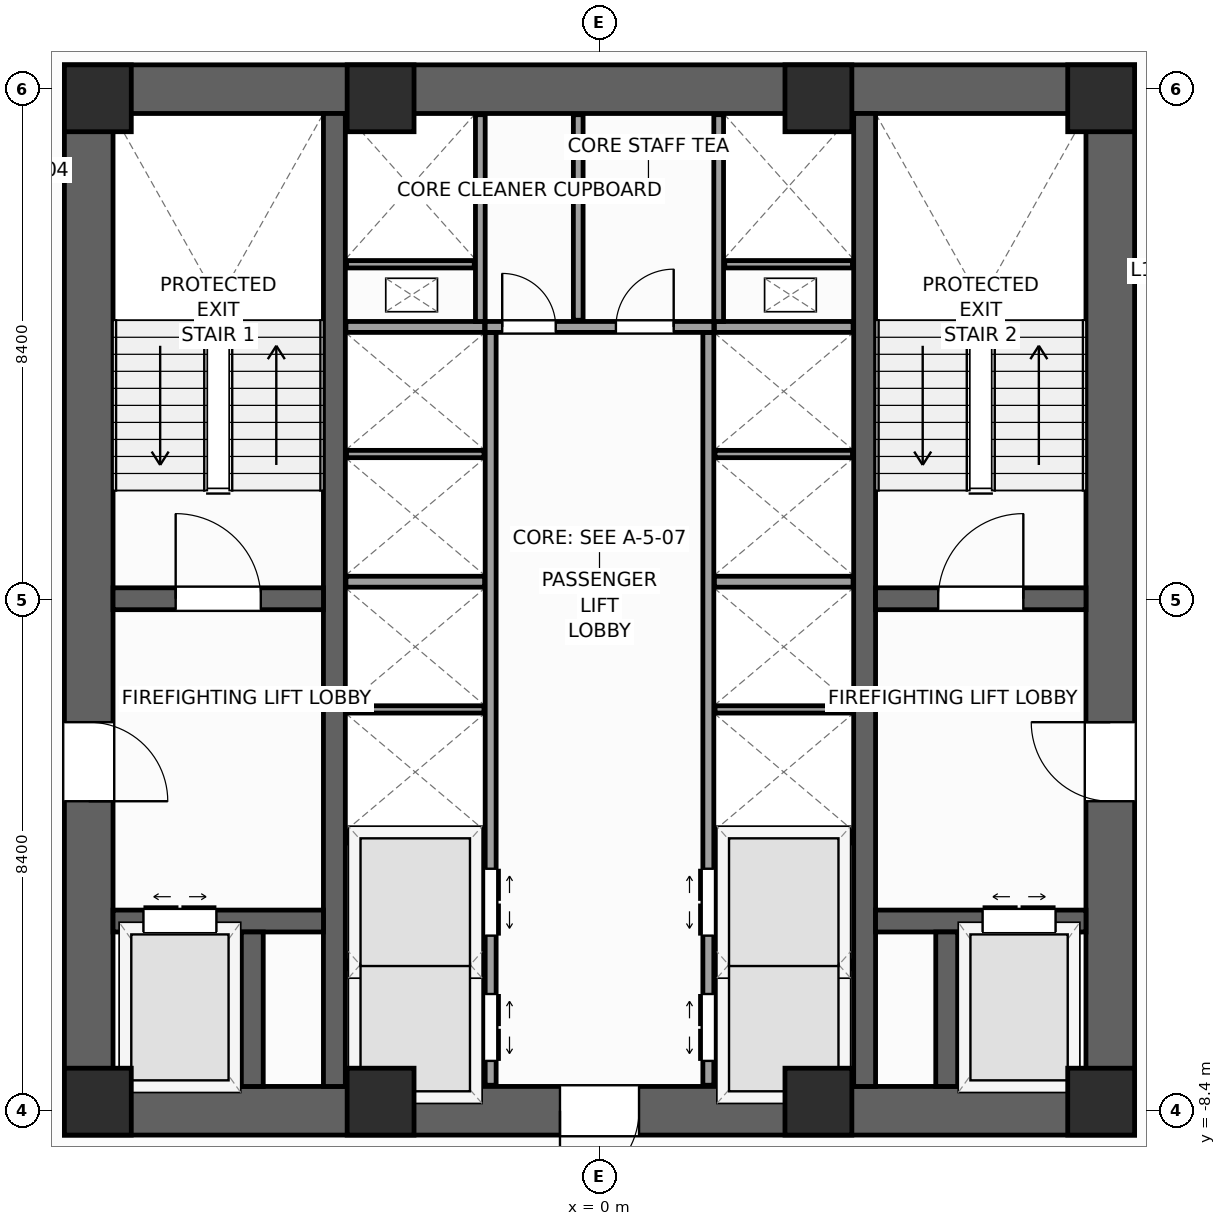
"""IFC4 building model, lengths in metres.
Left out: names, types, materials, properties, quantities, classifications, styles, units other than length and angle.
Written with IfcOpenShell. Run it as: python <this file> out.ifc"""

import sys

from ifc_helpers import new_model, si_unit, direction, frame, frame_2d, origin, origin_2d, place, context, subcontext, project, spatial, rectangle, extrude, source, transform, mapped, element, fill, save


model = new_model("IFC4")
c1 = context("Model", 3, precision=1e-05, world=origin(), true_north=direction((0.0, 1.0)))
c2 = subcontext(c1, "Body", "Model", "MODEL_VIEW")
j1 = project(units=[si_unit("LENGTHUNIT", "METRE"), si_unit("PLANEANGLEUNIT", "RADIAN")], contexts=[c1])
p1 = place(None, origin())
s1 = spatial("IfcSite", under=j1, at=p1, CompositionType="ELEMENT")
p2 = place(p1, origin())
s2 = spatial("IfcBuilding", under=s1, at=p2, CompositionType="ELEMENT")
p3 = place(p2, frame((0.0, 0.0, 62.0)))
s3 = spatial("IfcBuildingStorey", under=s2, at=p3, CompositionType="ELEMENT", Elevation=62.0)
p4 = place(p3, frame((-8.8, -8.4, 0.0), z_axis=(0.0, 0.0, 1.0), x_axis=(1.0, 0.0, 0.0)))
e1 = element("IfcWall", 1, at=p4, inside=s3, PredefinedType="SHEAR", context=c2, shape_type="SweptSolid", body=[
    extrude(rectangle(XDim=17.6, YDim=0.8, at=frame_2d((8.8, 0.0))), origin(), (0.0, 0.0, 1.0), 4.0),
])
p5 = place(p4, frame((8.15, 0.0, 0.0)))
e2 = element("IfcOpeningElement", 2, at=p5, cuts=e1, PredefinedType="OPENING", context=c2, shape_type="SweptSolid", body=[
    extrude(rectangle(XDim=1.3, YDim=2.2, at=frame_2d((0.65, 1.1))), frame((0.0, 0.41, 0.0), z_axis=(0.0, -1.0, 0.0), x_axis=(1.0, 0.0, 0.0)), (0.0, 0.0, 1.0), 0.82),
])
p6 = place(p3, frame((-8.8, 8.4, 0.0), z_axis=(0.0, 0.0, 1.0), x_axis=(1.0, 0.0, 0.0)))
e3 = element("IfcWall", 3, at=p6, inside=s3, PredefinedType="SHEAR", context=c2, shape_type="SweptSolid", body=[
    extrude(rectangle(XDim=17.6, YDim=0.8, at=frame_2d((8.8, 0.0))), origin(), (0.0, 0.0, 1.0), 4.0),
])
p7 = place(p3, frame((-8.4, -8.0, 0.0), z_axis=(0.0, 0.0, 1.0), x_axis=(0.0, 1.0, 0.0)))
e4 = element("IfcWall", 4, at=p7, inside=s3, PredefinedType="SHEAR", context=c2, shape_type="SweptSolid", body=[
    extrude(rectangle(XDim=16.0, YDim=0.8, at=frame_2d((8.0, 0.0))), origin(), (0.0, 0.0, 1.0), 4.0),
])
p8 = place(p7, frame((4.69, 0.0, 0.0)))
e5 = element("IfcOpeningElement", 5, at=p8, cuts=e4, PredefinedType="OPENING", context=c2, shape_type="SweptSolid", body=[
    extrude(rectangle(XDim=1.3, YDim=2.2, at=frame_2d((0.65, 1.1))), frame((0.0, 0.41, 0.0), z_axis=(0.0, -1.0, 0.0), x_axis=(1.0, 0.0, 0.0)), (0.0, 0.0, 1.0), 0.82),
])
p9 = place(p3, frame((8.4, -8.0, 0.0), z_axis=(0.0, 0.0, 1.0), x_axis=(0.0, 1.0, 0.0)))
e6 = element("IfcWall", 6, at=p9, inside=s3, PredefinedType="SHEAR", context=c2, shape_type="SweptSolid", body=[
    extrude(rectangle(XDim=16.0, YDim=0.8, at=frame_2d((8.0, 0.0))), origin(), (0.0, 0.0, 1.0), 4.0),
])
p10 = place(p9, frame((4.69, 0.0, 0.0)))
e7 = element("IfcOpeningElement", 7, at=p10, cuts=e6, PredefinedType="OPENING", context=c2, shape_type="SweptSolid", body=[
    extrude(rectangle(XDim=1.3, YDim=2.2, at=frame_2d((0.65, 1.1))), frame((0.0, 0.41, 0.0), z_axis=(0.0, -1.0, 0.0), x_axis=(1.0, 0.0, 0.0)), (0.0, 0.0, 1.0), 0.82),
])
for number, where, z_axis, x_axis in (
    (8, (-4.36, -8.0, 0.0), (0.0, 0.0, 1.0), (0.0, 1.0, 0.0)),
    (9, (4.36, -8.0, 0.0), (0.0, 0.0, 1.0), (0.0, 1.0, 0.0)),
):
    element("IfcWall", number, at=place(p3, frame(where, z_axis=z_axis, x_axis=x_axis)), inside=s3, PredefinedType="SHEAR", context=c2, shape_type="SweptSolid", body=[
        extrude(rectangle(XDim=16.0, YDim=0.36, at=frame_2d((8.0, 0.0))), origin(), (0.0, 0.0, 1.0), 4.0),
    ])
p11 = place(p3, frame((-8.0, 0.02, 0.0), z_axis=(0.0, 0.0, 1.0), x_axis=(1.0, 0.0, 0.0)))
e10 = element("IfcWall", 10, at=p11, inside=s3, PredefinedType="SHEAR", context=c2, shape_type="SweptSolid", body=[
    extrude(rectangle(XDim=3.46, YDim=0.36, at=frame_2d((1.73, 0.0))), origin(), (0.0, 0.0, 1.0), 4.0),
])
p12 = place(p11, frame((1.03, 0.0, 0.0)))
e11 = element("IfcOpeningElement", 11, at=p12, cuts=e10, PredefinedType="OPENING", context=c2, shape_type="SweptSolid", body=[
    extrude(rectangle(XDim=1.4, YDim=2.2, at=frame_2d((0.7, 1.1))), frame((0.0, 0.19, 0.0), z_axis=(0.0, -1.0, 0.0), x_axis=(1.0, 0.0, 0.0)), (0.0, 0.0, 1.0), 0.38),
])
p13 = place(p3, frame((4.54, 0.02, 0.0), z_axis=(0.0, 0.0, 1.0), x_axis=(1.0, 0.0, 0.0)))
e12 = element("IfcWall", 12, at=p13, inside=s3, PredefinedType="SHEAR", context=c2, shape_type="SweptSolid", body=[
    extrude(rectangle(XDim=3.46, YDim=0.36, at=frame_2d((1.73, 0.0))), origin(), (0.0, 0.0, 1.0), 4.0),
])
p14 = place(p13, frame((1.03, 0.0, 0.0)))
e13 = element("IfcOpeningElement", 13, at=p14, cuts=e12, PredefinedType="OPENING", context=c2, shape_type="SweptSolid", body=[
    extrude(rectangle(XDim=1.4, YDim=2.2, at=frame_2d((0.7, 1.1))), frame((0.0, 0.19, 0.0), z_axis=(0.0, -1.0, 0.0), x_axis=(1.0, 0.0, 0.0)), (0.0, 0.0, 1.0), 0.38),
])
p15 = place(p3, frame((-8.0, -5.28, 0.0), z_axis=(0.0, 0.0, 1.0), x_axis=(1.0, 0.0, 0.0)))
e14 = element("IfcWall", 14, at=p15, inside=s3, PredefinedType="SHEAR", context=c2, shape_type="SweptSolid", body=[
    extrude(rectangle(XDim=3.46, YDim=0.36, at=frame_2d((1.73, 0.0))), origin(), (0.0, 0.0, 1.0), 4.0),
])
p16 = place(p15, frame((0.5, 0.0, 0.0)))
e15 = element("IfcOpeningElement", 15, at=p16, cuts=e14, PredefinedType="OPENING", context=c2, shape_type="SweptSolid", body=[
    extrude(rectangle(XDim=1.2, YDim=2.25, at=frame_2d((0.6, 1.125))), frame((0.0, 0.19, 0.0), z_axis=(0.0, -1.0, 0.0), x_axis=(1.0, 0.0, 0.0)), (0.0, 0.0, 1.0), 0.38),
])
p17 = place(p3, frame((4.54, -5.28, 0.0), z_axis=(0.0, 0.0, 1.0), x_axis=(1.0, 0.0, 0.0)))
e16 = element("IfcWall", 16, at=p17, inside=s3, PredefinedType="SHEAR", context=c2, shape_type="SweptSolid", body=[
    extrude(rectangle(XDim=3.46, YDim=0.36, at=frame_2d((1.73, 0.0))), origin(), (0.0, 0.0, 1.0), 4.0),
])
p18 = place(p17, frame((1.76, 0.0, 0.0)))
e17 = element("IfcOpeningElement", 17, at=p18, cuts=e16, PredefinedType="OPENING", context=c2, shape_type="SweptSolid", body=[
    extrude(rectangle(XDim=1.2, YDim=2.25, at=frame_2d((0.6, 1.125))), frame((0.0, 0.19, 0.0), z_axis=(0.0, -1.0, 0.0), x_axis=(1.0, 0.0, 0.0)), (0.0, 0.0, 1.0), 0.38),
])
for number, where, z_axis, x_axis in (
    (18, (-5.71, -8.0, 0.0), (0.0, 0.0, 1.0), (0.0, 1.0, 0.0)),
    (19, (5.71, -8.0, 0.0), (0.0, 0.0, 1.0), (0.0, 1.0, 0.0)),
):
    element("IfcWall", number, at=place(p3, frame(where, z_axis=z_axis, x_axis=x_axis)), inside=s3, PredefinedType="SHEAR", context=c2, shape_type="SweptSolid", body=[
        extrude(rectangle(XDim=2.54, YDim=0.36, at=frame_2d((1.27, 0.0))), origin(), (0.0, 0.0, 1.0), 4.0),
    ])
m1 = source(origin(), c2, "Body", "SweptSolid", [
    extrude(rectangle(XDim=1.1, YDim=1.1, at=origin_2d()), origin(), (0.0, 0.0, 1.0), 4.0),
])
for number, where, z_axis, x_axis in (
    (20, (-8.25, -8.25, 0.0), (0.0, 0.0, 1.0), (1.0, 0.0, 0.0)),
    (21, (8.25, -8.25, 0.0), (0.0, 0.0, 1.0), (1.0, 0.0, 0.0)),
    (22, (8.25, 8.25, 0.0), (0.0, 0.0, 1.0), (1.0, 0.0, 0.0)),
    (23, (-8.25, 8.25, 0.0), (0.0, 0.0, 1.0), (1.0, 0.0, 0.0)),
    (24, (-3.6, -8.25, 0.0), (0.0, 0.0, 1.0), (1.0, 0.0, 0.0)),
    (25, (3.6, -8.25, 0.0), (0.0, 0.0, 1.0), (1.0, 0.0, 0.0)),
    (26, (-3.6, 8.25, 0.0), (0.0, 0.0, 1.0), (1.0, 0.0, 0.0)),
    (27, (3.6, 8.25, 0.0), (0.0, 0.0, 1.0), (1.0, 0.0, 0.0)),
):
    element("IfcColumn", number, at=place(p3, frame(where, z_axis=z_axis, x_axis=x_axis)), inside=s3, PredefinedType="PILASTER", context=c2, shape_type="MappedRepresentation", body=[
        mapped(m1, transform((0.0, 0.0, 0.0), scale=1.0)),
    ])
p19 = place(p3, frame((-1.79, -7.98, 0.0), z_axis=(0.0, 0.0, 1.0), x_axis=(0.0, 1.0, 0.0)))
e28 = element("IfcWall", 28, at=p19, inside=s3, PredefinedType="PARTITIONING", context=c2, shape_type="SweptSolid", body=[
    extrude(rectangle(XDim=12.38, YDim=0.18, at=frame_2d((6.19, 0.0))), origin(), (0.0, 0.0, 1.0), 3.72),
])
p20 = place(p19, frame((0.4, 0.0, 0.0)))
e29 = element("IfcOpeningElement", 29, at=p20, cuts=e28, PredefinedType="OPENING", context=c2, shape_type="SweptSolid", body=[
    extrude(rectangle(XDim=1.1, YDim=2.2, at=frame_2d((0.55, 1.1))), frame((0.0, 0.1, 0.0), z_axis=(0.0, -1.0, 0.0), x_axis=(1.0, 0.0, 0.0)), (0.0, 0.0, 1.0), 0.2),
])
p21 = place(p19, frame((2.46, 0.0, 0.0)))
e30 = element("IfcOpeningElement", 30, at=p21, cuts=e28, PredefinedType="OPENING", context=c2, shape_type="SweptSolid", body=[
    extrude(rectangle(XDim=1.1, YDim=2.2, at=frame_2d((0.55, 1.1))), frame((0.0, 0.1, 0.0), z_axis=(0.0, -1.0, 0.0), x_axis=(1.0, 0.0, 0.0)), (0.0, 0.0, 1.0), 0.2),
])
p22 = place(p3, frame((1.79, -7.98, 0.0), z_axis=(0.0, 0.0, 1.0), x_axis=(0.0, 1.0, 0.0)))
e31 = element("IfcWall", 31, at=p22, inside=s3, PredefinedType="PARTITIONING", context=c2, shape_type="SweptSolid", body=[
    extrude(rectangle(XDim=12.38, YDim=0.18, at=frame_2d((6.19, 0.0))), origin(), (0.0, 0.0, 1.0), 3.72),
])
p23 = place(p22, frame((0.4, 0.0, 0.0)))
e32 = element("IfcOpeningElement", 32, at=p23, cuts=e31, PredefinedType="OPENING", context=c2, shape_type="SweptSolid", body=[
    extrude(rectangle(XDim=1.1, YDim=2.2, at=frame_2d((0.55, 1.1))), frame((0.0, 0.1, 0.0), z_axis=(0.0, -1.0, 0.0), x_axis=(1.0, 0.0, 0.0)), (0.0, 0.0, 1.0), 0.2),
])
p24 = place(p22, frame((2.46, 0.0, 0.0)))
e33 = element("IfcOpeningElement", 33, at=p24, cuts=e31, PredefinedType="OPENING", context=c2, shape_type="SweptSolid", body=[
    extrude(rectangle(XDim=1.1, YDim=2.2, at=frame_2d((0.55, 1.1))), frame((0.0, 0.1, 0.0), z_axis=(0.0, -1.0, 0.0), x_axis=(1.0, 0.0, 0.0)), (0.0, 0.0, 1.0), 0.2),
])
p25 = place(p3, frame((-1.88, 4.49, 0.0), z_axis=(0.0, 0.0, 1.0), x_axis=(1.0, 0.0, 0.0)))
e34 = element("IfcWall", 34, at=p25, inside=s3, PredefinedType="PARTITIONING", context=c2, shape_type="SweptSolid", body=[
    extrude(rectangle(XDim=3.76, YDim=0.18, at=frame_2d((1.88, 0.0))), origin(), (0.0, 0.0, 1.0), 3.72),
])
p26 = place(p25, frame((0.28, 0.0, 0.0)))
e35 = element("IfcOpeningElement", 35, at=p26, cuts=e34, PredefinedType="OPENING", context=c2, shape_type="SweptSolid", body=[
    extrude(rectangle(XDim=0.88, YDim=2.1, at=frame_2d((0.44, 1.05))), frame((0.0, 0.1, 0.0), z_axis=(0.0, -1.0, 0.0), x_axis=(1.0, 0.0, 0.0)), (0.0, 0.0, 1.0), 0.2),
])
p27 = place(p25, frame((2.15, 0.0, 0.0)))
e36 = element("IfcOpeningElement", 36, at=p27, cuts=e34, PredefinedType="OPENING", context=c2, shape_type="SweptSolid", body=[
    extrude(rectangle(XDim=0.95, YDim=2.1, at=frame_2d((0.475, 1.05))), frame((0.0, 0.1, 0.0), z_axis=(0.0, -1.0, 0.0), x_axis=(1.0, 0.0, 0.0)), (0.0, 0.0, 1.0), 0.2),
])
for number, where, z_axis, x_axis in (
    (37, (-4.17, -3.9, 0.0), (0.0, 0.0, 1.0), (1.0, 0.0, 0.0)),
    (38, (1.89, -3.9, 0.0), (0.0, 0.0, 1.0), (1.0, 0.0, 0.0)),
    (39, (-4.17, 0.3, 0.0), (0.0, 0.0, 1.0), (1.0, 0.0, 0.0)),
    (40, (1.89, 0.3, 0.0), (0.0, 0.0, 1.0), (1.0, 0.0, 0.0)),
    (41, (-4.17, 4.49, 0.0), (0.0, 0.0, 1.0), (1.0, 0.0, 0.0)),
    (42, (1.89, 4.49, 0.0), (0.0, 0.0, 1.0), (1.0, 0.0, 0.0)),
):
    element("IfcWall", number, at=place(p3, frame(where, z_axis=z_axis, x_axis=x_axis)), inside=s3, PredefinedType="PARTITIONING", context=c2, shape_type="SweptSolid", body=[
        extrude(rectangle(XDim=2.28, YDim=0.18, at=frame_2d((1.14, 0.0))), origin(), (0.0, 0.0, 1.0), 3.72),
    ])
for number, where, z_axis, x_axis in (
    (43, (-4.16, -6.0, 0.0), (0.0, 0.0, 1.0), (1.0, 0.0, 0.0)),
    (44, (1.9, -6.0, 0.0), (0.0, 0.0, 1.0), (1.0, 0.0, 0.0)),
    (45, (-4.16, -1.8, 0.0), (0.0, 0.0, 1.0), (1.0, 0.0, 0.0)),
    (46, (1.9, -1.8, 0.0), (0.0, 0.0, 1.0), (1.0, 0.0, 0.0)),
    (47, (-4.16, 2.4, 0.0), (0.0, 0.0, 1.0), (1.0, 0.0, 0.0)),
    (48, (1.9, 2.4, 0.0), (0.0, 0.0, 1.0), (1.0, 0.0, 0.0)),
):
    element("IfcWall", number, at=place(p3, frame(where, z_axis=z_axis, x_axis=x_axis)), inside=s3, PredefinedType="PARTITIONING", context=c2, shape_type="SweptSolid", body=[
        extrude(rectangle(XDim=2.26, YDim=0.12, at=frame_2d((1.13, 0.0))), origin(), (0.0, 0.0, 1.0), 3.72),
    ])
for number, where, z_axis, x_axis in (
    (49, (-1.96, 4.58, 0.0), (0.0, 0.0, 1.0), (0.0, 1.0, 0.0)),
    (50, (1.96, 4.58, 0.0), (0.0, 0.0, 1.0), (0.0, 1.0, 0.0)),
):
    element("IfcWall", number, at=place(p3, frame(where, z_axis=z_axis, x_axis=x_axis)), inside=s3, PredefinedType="PARTITIONING", context=c2, shape_type="SweptSolid", body=[
        extrude(rectangle(XDim=3.4, YDim=0.16, at=frame_2d((1.7, 0.0))), origin(), (0.0, 0.0, 1.0), 3.72),
    ])
for number, where, z_axis, x_axis in (
    (51, (-4.16, 5.52, 0.0), (0.0, 0.0, 1.0), (1.0, 0.0, 0.0)),
    (52, (2.06, 5.52, 0.0), (0.0, 0.0, 1.0), (1.0, 0.0, 0.0)),
):
    element("IfcWall", number, at=place(p3, frame(where, z_axis=z_axis, x_axis=x_axis)), inside=s3, PredefinedType="PARTITIONING", context=c2, shape_type="SweptSolid", body=[
        extrude(rectangle(XDim=2.1, YDim=0.12, at=frame_2d((1.05, 0.0))), origin(), (0.0, 0.0, 1.0), 3.72),
    ])
p28 = place(p3, frame((-0.35, 4.6, 0.0), z_axis=(0.0, 0.0, 1.0), x_axis=(0.0, 1.0, 0.0)))
e53 = element("IfcWall", 53, at=p28, inside=s3, PredefinedType="PARTITIONING", context=c2, shape_type="SweptSolid", body=[
    extrude(rectangle(XDim=3.38, YDim=0.16, at=frame_2d((1.69, 0.0))), origin(), (0.0, 0.0, 1.0), 3.72),
])
m2 = source(origin(), c2, "Body", "SweptSolid", [
    extrude(rectangle(XDim=1.4, YDim=2.2, at=frame_2d((0.7, 1.1))), frame((0.0, 0.025, 0.0), z_axis=(0.0, -1.0, 0.0), x_axis=(1.0, 0.0, 0.0)), (0.0, 0.0, 1.0), 0.05),
])
p29 = place(p12, origin())
e54 = element("IfcDoor", 54, at=p29, inside=s3, OperationType="SINGLE_SWING_LEFT", PredefinedType="DOOR", context=c2, shape_type="MappedRepresentation", body=[
    mapped(m2, transform((0.0, 0.0, 0.0), scale=1.0)),
])
fill(e11, e54)
p30 = place(p14, origin())
e55 = element("IfcDoor", 55, at=p30, inside=s3, OperationType="SINGLE_SWING_RIGHT", PredefinedType="DOOR", context=c2, shape_type="MappedRepresentation", body=[
    mapped(m2, transform((0.0, 0.0, 0.0), scale=1.0)),
])
fill(e13, e55)
m3 = source(origin(), c2, "Body", "SweptSolid", [
    extrude(rectangle(XDim=1.3, YDim=2.2, at=frame_2d((0.65, 1.1))), frame((0.0, 0.025, 0.0), z_axis=(0.0, -1.0, 0.0), x_axis=(1.0, 0.0, 0.0)), (0.0, 0.0, 1.0), 0.05),
])
p31 = place(p8, frame((1.3, 0.0, 0.0), z_axis=(0.0, 0.0, 1.0), x_axis=(-1.0, 0.0, 0.0)))
e56 = element("IfcDoor", 56, at=p31, inside=s3, OperationType="SINGLE_SWING_LEFT", PredefinedType="DOOR", context=c2, shape_type="MappedRepresentation", body=[
    mapped(m3, transform((0.0, 0.0, 0.0), scale=1.0)),
])
fill(e5, e56)
p32 = place(p10, origin())
e57 = element("IfcDoor", 57, at=p32, inside=s3, OperationType="SINGLE_SWING_RIGHT", PredefinedType="DOOR", context=c2, shape_type="MappedRepresentation", body=[
    mapped(m3, transform((0.0, 0.0, 0.0), scale=1.0)),
])
fill(e7, e57)
p33 = place(p5, frame((1.3, 0.0, 0.0), z_axis=(0.0, 0.0, 1.0), x_axis=(-1.0, 0.0, 0.0)))
e58 = element("IfcDoor", 58, at=p33, inside=s3, OperationType="SINGLE_SWING_LEFT", PredefinedType="DOOR", context=c2, shape_type="MappedRepresentation", body=[
    mapped(m3, transform((0.0, 0.0, 0.0), scale=1.0)),
])
fill(e2, e58)
m4 = source(origin(), c2, "Body", "SweptSolid", [
    extrude(rectangle(XDim=1.2, YDim=2.25, at=frame_2d((0.6, 1.125))), frame((0.0, 0.025, 0.0), z_axis=(0.0, -1.0, 0.0), x_axis=(1.0, 0.0, 0.0)), (0.0, 0.0, 1.0), 0.05),
])
p34 = place(p16, origin())
e59 = element("IfcDoor", 59, at=p34, inside=s3, OperationType="DOUBLE_DOOR_SLIDING", PredefinedType="DOOR", context=c2, shape_type="MappedRepresentation", body=[
    mapped(m4, transform((0.0, 0.0, 0.0), scale=1.0)),
])
fill(e15, e59)
p35 = place(p18, origin())
e60 = element("IfcDoor", 60, at=p35, inside=s3, OperationType="DOUBLE_DOOR_SLIDING", PredefinedType="DOOR", context=c2, shape_type="MappedRepresentation", body=[
    mapped(m4, transform((0.0, 0.0, 0.0), scale=1.0)),
])
fill(e17, e60)
m5 = source(origin(), c2, "Body", "SweptSolid", [
    extrude(rectangle(XDim=1.1, YDim=2.2, at=frame_2d((0.55, 1.1))), frame((0.0, 0.025, 0.0), z_axis=(0.0, -1.0, 0.0), x_axis=(1.0, 0.0, 0.0)), (0.0, 0.0, 1.0), 0.05),
])
p36 = place(p20, frame((1.1, 0.0, 0.0), z_axis=(0.0, 0.0, 1.0), x_axis=(-1.0, 0.0, 0.0)))
e61 = element("IfcDoor", 61, at=p36, inside=s3, OperationType="DOUBLE_DOOR_SLIDING", PredefinedType="DOOR", context=c2, shape_type="MappedRepresentation", body=[
    mapped(m5, transform((0.0, 0.0, 0.0), scale=1.0)),
])
fill(e29, e61)
p37 = place(p21, frame((1.1, 0.0, 0.0), z_axis=(0.0, 0.0, 1.0), x_axis=(-1.0, 0.0, 0.0)))
e62 = element("IfcDoor", 62, at=p37, inside=s3, OperationType="DOUBLE_DOOR_SLIDING", PredefinedType="DOOR", context=c2, shape_type="MappedRepresentation", body=[
    mapped(m5, transform((0.0, 0.0, 0.0), scale=1.0)),
])
fill(e30, e62)
p38 = place(p23, origin())
e63 = element("IfcDoor", 63, at=p38, inside=s3, OperationType="DOUBLE_DOOR_SLIDING", PredefinedType="DOOR", context=c2, shape_type="MappedRepresentation", body=[
    mapped(m5, transform((0.0, 0.0, 0.0), scale=1.0)),
])
fill(e32, e63)
p39 = place(p24, origin())
e64 = element("IfcDoor", 64, at=p39, inside=s3, OperationType="DOUBLE_DOOR_SLIDING", PredefinedType="DOOR", context=c2, shape_type="MappedRepresentation", body=[
    mapped(m5, transform((0.0, 0.0, 0.0), scale=1.0)),
])
fill(e33, e64)
m6 = source(origin(), c2, "Body", "SweptSolid", [
    extrude(rectangle(XDim=0.88, YDim=2.1, at=frame_2d((0.44, 1.05))), frame((0.0, 0.025, 0.0), z_axis=(0.0, -1.0, 0.0), x_axis=(1.0, 0.0, 0.0)), (0.0, 0.0, 1.0), 0.05),
])
p40 = place(p26, origin())
e65 = element("IfcDoor", 65, at=p40, inside=s3, OperationType="SINGLE_SWING_LEFT", PredefinedType="DOOR", context=c2, shape_type="MappedRepresentation", body=[
    mapped(m6, transform((0.0, 0.0, 0.0), scale=1.0)),
])
fill(e35, e65)
m7 = source(origin(), c2, "Body", "SweptSolid", [
    extrude(rectangle(XDim=0.95, YDim=2.1, at=frame_2d((0.475, 1.05))), frame((0.0, 0.025, 0.0), z_axis=(0.0, -1.0, 0.0), x_axis=(1.0, 0.0, 0.0)), (0.0, 0.0, 1.0), 0.05),
])
p41 = place(p27, origin())
e66 = element("IfcDoor", 66, at=p41, inside=s3, OperationType="SINGLE_SWING_RIGHT", PredefinedType="DOOR", context=c2, shape_type="MappedRepresentation", body=[
    mapped(m7, transform((0.0, 0.0, 0.0), scale=1.0)),
])
fill(e36, e66)
save(model, sys.argv[1])
